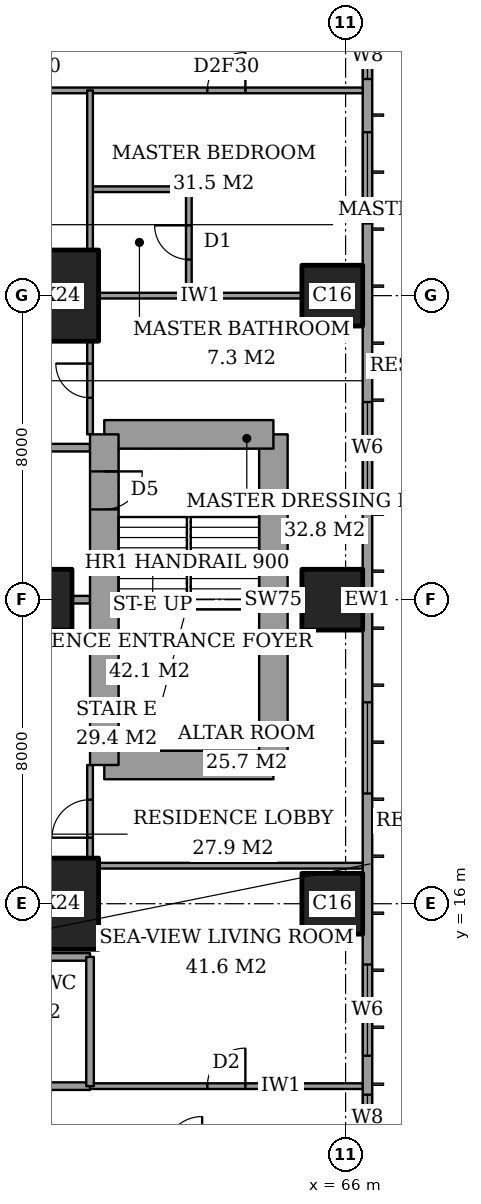
"""IFC4 building model, lengths in metres.
Left out: names, types, materials, properties, quantities, classifications, styles, units other than length and angle.
Written with IfcOpenShell. Run it as: python <this file> out.ifc"""

import sys

from ifc_helpers import new_model, si_unit, direction, frame, frame_2d, origin, origin_2d, place, context, subcontext, project, spatial, rectangle, extrude, element, fill, save


model = new_model("IFC4")
c1 = context("Model", 3, precision=1e-05, world=origin(), true_north=direction((0.0, 1.0)))
c2 = subcontext(c1, "Body", "Model", "MODEL_VIEW")
j1 = project(units=[si_unit("LENGTHUNIT", "METRE"), si_unit("PLANEANGLEUNIT", "RADIAN")], contexts=[c1])
p1 = place(None, origin())
s1 = spatial("IfcSite", under=j1, at=p1, CompositionType="ELEMENT")
p2 = place(p1, origin())
s2 = spatial("IfcBuilding", under=s1, at=p2, CompositionType="ELEMENT")
p3 = place(p2, frame((0.0, 0.0, 259.2)))
s3 = spatial("IfcBuildingStorey", under=s2, at=p3, CompositionType="ELEMENT", Elevation=259.2)
p4 = place(p3, frame((58.0, 16.0, 0.0), z_axis=(0.0, 0.0, 1.0), x_axis=(1.0, 0.0, 0.0)))
e1 = element("IfcColumn", 1, at=p4, inside=s3, PredefinedType="COLUMN", context=c2, shape_type="SweptSolid", body=[
    extrude(rectangle(XDim=3.0, YDim=2.4, at=origin_2d()), origin(), (0.0, 0.0, 1.0), 3.6),
])
p5 = place(p3, frame((58.0, 24.0, 0.0), z_axis=(0.0, 0.0, 1.0), x_axis=(1.0, 0.0, 0.0)))
e2 = element("IfcColumn", 2, at=p5, inside=s3, PredefinedType="COLUMN", context=c2, shape_type="SweptSolid", body=[
    extrude(rectangle(XDim=1.6, YDim=1.6, at=origin_2d()), origin(), (0.0, 0.0, 1.0), 3.6),
])
p6 = place(p3, frame((58.0, 32.0, 0.0), z_axis=(0.0, 0.0, 1.0), x_axis=(1.0, 0.0, 0.0)))
e3 = element("IfcColumn", 3, at=p6, inside=s3, PredefinedType="COLUMN", context=c2, shape_type="SweptSolid", body=[
    extrude(rectangle(XDim=3.0, YDim=2.4, at=origin_2d()), origin(), (0.0, 0.0, 1.0), 3.6),
])
for number, where, z_axis, x_axis in (
    (4, (65.65, 16.0, 0.0), (0.0, 0.0, 1.0), (1.0, 0.0, 0.0)),
    (5, (65.65, 24.0, 0.0), (0.0, 0.0, 1.0), (1.0, 0.0, 0.0)),
    (6, (65.65, 32.0, 0.0), (0.0, 0.0, 1.0), (1.0, 0.0, 0.0)),
):
    element("IfcColumn", number, at=place(p3, frame(where, z_axis=z_axis, x_axis=x_axis)), inside=s3, PredefinedType="COLUMN", context=c2, shape_type="SweptSolid", body=[
        extrude(rectangle(XDim=1.6, YDim=1.6, at=origin_2d()), origin(), (0.0, 0.0, 1.0), 3.6),
    ])
p7 = place(p3, frame((59.65, 19.65, 0.0), z_axis=(0.0, 0.0, 1.0), x_axis=(1.0, 0.0, 0.0)))
e7 = element("IfcWall", 7, at=p7, inside=s3, PredefinedType="SHEAR", context=c2, shape_type="SweptSolid", body=[
    extrude(rectangle(XDim=4.45, YDim=0.75, at=frame_2d((2.225, 0.0))), origin(), (0.0, 0.0, 1.0), 3.6),
])
p8 = place(p3, frame((64.1, 19.65, 0.0), z_axis=(0.0, 0.0, 1.0), x_axis=(0.0, 1.0, 0.0)))
e8 = element("IfcWall", 8, at=p8, inside=s3, PredefinedType="SHEAR", context=c2, shape_type="SweptSolid", body=[
    extrude(rectangle(XDim=8.7, YDim=0.75, at=frame_2d((4.35, 0.0))), origin(), (0.0, 0.0, 1.0), 3.6),
])
p9 = place(p3, frame((64.1, 28.35, 0.0), z_axis=(0.0, 0.0, 1.0), x_axis=(-1.0, 0.0, 0.0)))
e9 = element("IfcWall", 9, at=p9, inside=s3, PredefinedType="SHEAR", context=c2, shape_type="SweptSolid", body=[
    extrude(rectangle(XDim=4.45, YDim=0.75, at=frame_2d((2.225, 0.0))), origin(), (0.0, 0.0, 1.0), 3.6),
])
p10 = place(p3, frame((59.65, 28.35, 0.0), z_axis=(0.0, 0.0, 1.0), x_axis=(0.0, -1.0, 0.0)))
e10 = element("IfcWall", 10, at=p10, inside=s3, PredefinedType="SHEAR", context=c2, shape_type="SweptSolid", body=[
    extrude(rectangle(XDim=8.7, YDim=0.75, at=frame_2d((4.35, 0.0))), origin(), (0.0, 0.0, 1.0), 3.6),
])
p11 = place(p10, frame((0.975, 0.0, 0.0)))
e11 = element("IfcOpeningElement", 11, at=p11, cuts=e10, PredefinedType="OPENING", context=c2, shape_type="SweptSolid", body=[
    extrude(rectangle(XDim=1.0, YDim=2.1, at=frame_2d((0.5, 1.05))), frame((0.0, 0.385, 0.0), z_axis=(0.0, -1.0, 0.0), x_axis=(1.0, 0.0, 0.0)), (0.0, 0.0, 1.0), 0.77),
])
p12 = place(p3, frame((66.575, 3.175, 0.0), z_axis=(0.0, 0.0, 1.0), x_axis=(0.0, 1.0, 0.0)))
e12 = element("IfcWall", 12, at=p12, inside=s3, PredefinedType="SOLIDWALL", context=c2, shape_type="SweptSolid", body=[
    extrude(rectangle(XDim=41.65, YDim=0.25, at=frame_2d((20.825, 0.0))), origin(), (0.0, 0.0, 1.0), 3.6),
])
p13 = place(p12, frame((0.875, 0.0, 0.6)))
e13 = element("IfcOpeningElement", 13, at=p13, cuts=e12, PredefinedType="OPENING", context=c2, shape_type="SweptSolid", body=[
    extrude(rectangle(XDim=2.4, YDim=2.0, at=frame_2d((1.2, 1.0))), frame((0.0, 0.135, 0.0), z_axis=(0.0, -1.0, 0.0), x_axis=(1.0, 0.0, 0.0)), (0.0, 0.0, 1.0), 0.27),
])
p14 = place(p12, frame((6.6, 0.0, 0.6)))
e14 = element("IfcOpeningElement", 14, at=p14, cuts=e12, PredefinedType="OPENING", context=c2, shape_type="SweptSolid", body=[
    extrude(rectangle(XDim=1.2, YDim=2.0, at=frame_2d((0.6, 1.0))), frame((0.0, 0.135, 0.0), z_axis=(0.0, -1.0, 0.0), x_axis=(1.0, 0.0, 0.0)), (0.0, 0.0, 1.0), 0.27),
])
p15 = place(p12, frame((8.825, 0.0, 0.6)))
e15 = element("IfcOpeningElement", 15, at=p15, cuts=e12, PredefinedType="OPENING", context=c2, shape_type="SweptSolid", body=[
    extrude(rectangle(XDim=2.4, YDim=2.0, at=frame_2d((1.2, 1.0))), frame((0.0, 0.135, 0.0), z_axis=(0.0, -1.0, 0.0), x_axis=(1.0, 0.0, 0.0)), (0.0, 0.0, 1.0), 0.27),
])
p16 = place(p12, frame((15.725, 0.0, 0.6)))
e16 = element("IfcOpeningElement", 16, at=p16, cuts=e12, PredefinedType="OPENING", context=c2, shape_type="SweptSolid", body=[
    extrude(rectangle(XDim=2.4, YDim=2.0, at=frame_2d((1.2, 1.0))), frame((0.0, 0.135, 0.0), z_axis=(0.0, -1.0, 0.0), x_axis=(1.0, 0.0, 0.0)), (0.0, 0.0, 1.0), 0.27),
])
p17 = place(p12, frame((23.625, 0.0, 0.6)))
e17 = element("IfcOpeningElement", 17, at=p17, cuts=e12, PredefinedType="OPENING", context=c2, shape_type="SweptSolid", body=[
    extrude(rectangle(XDim=2.4, YDim=2.0, at=frame_2d((1.2, 1.0))), frame((0.0, 0.135, 0.0), z_axis=(0.0, -1.0, 0.0), x_axis=(1.0, 0.0, 0.0)), (0.0, 0.0, 1.0), 0.27),
])
p18 = place(p12, frame((30.725, 0.0, 0.6)))
e18 = element("IfcOpeningElement", 18, at=p18, cuts=e12, PredefinedType="OPENING", context=c2, shape_type="SweptSolid", body=[
    extrude(rectangle(XDim=2.4, YDim=2.0, at=frame_2d((1.2, 1.0))), frame((0.0, 0.135, 0.0), z_axis=(0.0, -1.0, 0.0), x_axis=(1.0, 0.0, 0.0)), (0.0, 0.0, 1.0), 0.27),
])
p19 = place(p12, frame((34.525, 0.0, 0.6)))
e19 = element("IfcOpeningElement", 19, at=p19, cuts=e12, PredefinedType="OPENING", context=c2, shape_type="SweptSolid", body=[
    extrude(rectangle(XDim=1.2, YDim=2.0, at=frame_2d((0.6, 1.0))), frame((0.0, 0.135, 0.0), z_axis=(0.0, -1.0, 0.0), x_axis=(1.0, 0.0, 0.0)), (0.0, 0.0, 1.0), 0.27),
])
p20 = place(p12, frame((38.375, 0.0, 0.6)))
e20 = element("IfcOpeningElement", 20, at=p20, cuts=e12, PredefinedType="OPENING", context=c2, shape_type="SweptSolid", body=[
    extrude(rectangle(XDim=2.4, YDim=2.0, at=frame_2d((1.2, 1.0))), frame((0.0, 0.135, 0.0), z_axis=(0.0, -1.0, 0.0), x_axis=(1.0, 0.0, 0.0)), (0.0, 0.0, 1.0), 0.27),
])
p21 = place(p3, frame((55.6, 11.2, 0.0), z_axis=(0.0, 0.0, 1.0), x_axis=(1.0, 0.0, 0.0)))
e21 = element("IfcWall", 21, at=p21, inside=s3, PredefinedType="PARTITIONING", context=c2, shape_type="SweptSolid", body=[
    extrude(rectangle(XDim=3.675, YDim=0.2, at=frame_2d((1.837, 0.0))), origin(), (0.0, 0.0, 1.0), 3.35),
])
p22 = place(p21, frame((1.387, 0.0, 0.0)))
e22 = element("IfcOpeningElement", 22, at=p22, cuts=e21, PredefinedType="OPENING", context=c2, shape_type="SweptSolid", body=[
    extrude(rectangle(XDim=0.9, YDim=2.1, at=frame_2d((0.45, 1.05))), frame((0.0, 0.11, 0.0), z_axis=(0.0, -1.0, 0.0), x_axis=(1.0, 0.0, 0.0)), (0.0, 0.0, 1.0), 0.22),
])
p23 = place(p3, frame((59.275, 11.2, 0.0), z_axis=(0.0, 0.0, 1.0), x_axis=(1.0, 0.0, 0.0)))
e23 = element("IfcWall", 23, at=p23, inside=s3, PredefinedType="PARTITIONING", context=c2, shape_type="SweptSolid", body=[
    extrude(rectangle(XDim=7.175, YDim=0.15, at=frame_2d((3.587, 0.0))), origin(), (0.0, 0.0, 1.0), 3.35),
])
p24 = place(p23, frame((3.087, 0.0, 0.0)))
e24 = element("IfcOpeningElement", 24, at=p24, cuts=e23, PredefinedType="OPENING", context=c2, shape_type="SweptSolid", body=[
    extrude(rectangle(XDim=1.0, YDim=2.1, at=frame_2d((0.5, 1.05))), frame((0.0, 0.085, 0.0), z_axis=(0.0, -1.0, 0.0), x_axis=(1.0, 0.0, 0.0)), (0.0, 0.0, 1.0), 0.17),
])
p25 = place(p3, frame((55.6, 14.6, 0.0), z_axis=(0.0, 0.0, 1.0), x_axis=(1.0, 0.0, 0.0)))
e25 = element("IfcWall", 25, at=p25, inside=s3, PredefinedType="PARTITIONING", context=c2, shape_type="SweptSolid", body=[
    extrude(rectangle(XDim=3.675, YDim=0.2, at=frame_2d((1.837, 0.0))), origin(), (0.0, 0.0, 1.0), 3.35),
])
p26 = place(p3, frame((59.5, 17.0, 0.0), z_axis=(0.0, 0.0, 1.0), x_axis=(1.0, 0.0, 0.0)))
e26 = element("IfcWall", 26, at=p26, inside=s3, PredefinedType="PARTITIONING", context=c2, shape_type="SweptSolid", body=[
    extrude(rectangle(XDim=6.95, YDim=0.15, at=frame_2d((3.475, 0.0))), origin(), (0.0, 0.0, 1.0), 3.35),
])
p27 = place(p3, frame((58.8, 24.0, 0.0), z_axis=(0.0, 0.0, 1.0), x_axis=(1.0, 0.0, 0.0)))
e27 = element("IfcWall", 27, at=p27, inside=s3, PredefinedType="PARTITIONING", context=c2, shape_type="SweptSolid", body=[
    extrude(rectangle(XDim=0.475, YDim=0.2, at=frame_2d((0.237, 0.0))), origin(), (0.0, 0.0, 1.0), 3.35),
])
p28 = place(p3, frame((64.475, 24.0, 0.0), z_axis=(0.0, 0.0, 1.0), x_axis=(1.0, 0.0, 0.0)))
e28 = element("IfcWall", 28, at=p28, inside=s3, PredefinedType="PARTITIONING", context=c2, shape_type="SweptSolid", body=[
    extrude(rectangle(XDim=0.375, YDim=0.15, at=frame_2d((0.188, 0.0))), origin(), (0.0, 0.0, 1.0), 3.35),
])
p29 = place(p3, frame((42.0, 28.0, 0.0), z_axis=(0.0, 0.0, 1.0), x_axis=(1.0, 0.0, 0.0)))
e29 = element("IfcWall", 29, at=p29, inside=s3, PredefinedType="PARTITIONING", context=c2, shape_type="SweptSolid", body=[
    extrude(rectangle(XDim=17.275, YDim=0.2, at=frame_2d((8.637, 0.0))), origin(), (0.0, 0.0, 1.0), 3.35),
])
p30 = place(p29, frame((9.4, 0.0, 0.0)))
e30 = element("IfcOpeningElement", 30, at=p30, cuts=e29, PredefinedType="OPENING", context=c2, shape_type="SweptSolid", body=[
    extrude(rectangle(XDim=1.2, YDim=2.4, at=frame_2d((0.6, 1.2))), frame((0.0, 0.11, 0.0), z_axis=(0.0, -1.0, 0.0), x_axis=(1.0, 0.0, 0.0)), (0.0, 0.0, 1.0), 0.22),
])
p31 = place(p3, frame((59.5, 32.0, 0.0), z_axis=(0.0, 0.0, 1.0), x_axis=(1.0, 0.0, 0.0)))
e31 = element("IfcWall", 31, at=p31, inside=s3, PredefinedType="PARTITIONING", context=c2, shape_type="SweptSolid", body=[
    extrude(rectangle(XDim=5.35, YDim=0.15, at=frame_2d((2.675, 0.0))), origin(), (0.0, 0.0, 1.0), 2.634),
])
p32 = place(p3, frame((59.275, 34.8, 0.0), z_axis=(0.0, 0.0, 1.0), x_axis=(1.0, 0.0, 0.0)))
e32 = element("IfcWall", 32, at=p32, inside=s3, PredefinedType="PARTITIONING", context=c2, shape_type="SweptSolid", body=[
    extrude(rectangle(XDim=2.6, YDim=0.15, at=frame_2d((1.3, 0.0))), origin(), (0.0, 0.0, 1.0), 3.35),
])
p33 = place(p3, frame((41.439, 37.4, 0.0), z_axis=(0.0, 0.0, 1.0), x_axis=(1.0, 0.0, 0.0)))
e33 = element("IfcWall", 33, at=p33, inside=s3, PredefinedType="PARTITIONING", context=c2, shape_type="SweptSolid", body=[
    extrude(rectangle(XDim=25.011, YDim=0.15, at=frame_2d((12.505, 0.0))), origin(), (0.0, 0.0, 1.0), 3.35),
])
p34 = place(p33, frame((12.961, 0.0, 0.0)))
e34 = element("IfcOpeningElement", 34, at=p34, cuts=e33, PredefinedType="OPENING", context=c2, shape_type="SweptSolid", body=[
    extrude(rectangle(XDim=1.0, YDim=2.1, at=frame_2d((0.5, 1.05))), frame((0.0, 0.085, 0.0), z_axis=(0.0, -1.0, 0.0), x_axis=(1.0, 0.0, 0.0)), (0.0, 0.0, 1.0), 0.17),
])
p35 = place(p33, frame((20.924, 0.0, 0.0)))
e35 = element("IfcOpeningElement", 35, at=p35, cuts=e33, PredefinedType="OPENING", context=c2, shape_type="SweptSolid", body=[
    extrude(rectangle(XDim=1.0, YDim=2.1, at=frame_2d((0.5, 1.05))), frame((0.0, 0.085, 0.0), z_axis=(0.0, -1.0, 0.0), x_axis=(1.0, 0.0, 0.0)), (0.0, 0.0, 1.0), 0.17),
])
p36 = place(p33, frame((15.749, 0.0, 0.0)))
e36 = element("IfcOpeningElement", 36, at=p36, cuts=e33, PredefinedType="OPENING", context=c2, shape_type="SweptSolid", body=[
    extrude(rectangle(XDim=0.9, YDim=2.1, at=frame_2d((0.45, 1.05))), frame((0.0, 0.085, 0.0), z_axis=(0.0, -1.0, 0.0), x_axis=(1.0, 0.0, 0.0)), (0.0, 0.0, 1.0), 0.17),
])
p37 = place(p33, frame((8.961, 0.0, 0.0)))
e37 = element("IfcOpeningElement", 37, at=p37, cuts=e33, PredefinedType="OPENING", context=c2, shape_type="SweptSolid", body=[
    extrude(rectangle(XDim=1.0, YDim=2.1, at=frame_2d((0.5, 1.05))), frame((0.0, 0.085, 0.0), z_axis=(0.0, -1.0, 0.0), x_axis=(1.0, 0.0, 0.0)), (0.0, 0.0, 1.0), 0.17),
])
p38 = place(p33, frame((2.836, 0.0, 0.0)))
e38 = element("IfcOpeningElement", 38, at=p38, cuts=e33, PredefinedType="OPENING", context=c2, shape_type="SweptSolid", body=[
    extrude(rectangle(XDim=1.0, YDim=2.1, at=frame_2d((0.5, 1.05))), frame((0.0, 0.085, 0.0), z_axis=(0.0, -1.0, 0.0), x_axis=(1.0, 0.0, 0.0)), (0.0, 0.0, 1.0), 0.17),
])
p39 = place(p3, frame((59.275, 11.2, 0.0), z_axis=(0.0, 0.0, 1.0), x_axis=(0.0, 1.0, 0.0)))
e39 = element("IfcWall", 39, at=p39, inside=s3, PredefinedType="PARTITIONING", context=c2, shape_type="SweptSolid", body=[
    extrude(rectangle(XDim=3.4, YDim=0.2, at=frame_2d((1.7, 0.0))), origin(), (0.0, 0.0, 1.0), 3.35),
])
p40 = place(p3, frame((59.275, 17.2, 0.0), z_axis=(0.0, 0.0, 1.0), x_axis=(0.0, 1.0, 0.0)))
e40 = element("IfcWall", 40, at=p40, inside=s3, PredefinedType="PARTITIONING", context=c2, shape_type="SweptSolid", body=[
    extrude(rectangle(XDim=2.45, YDim=0.15, at=frame_2d((1.225, 0.0))), origin(), (0.0, 0.0, 1.0), 3.35),
])
p41 = place(p40, frame((0.538, 0.0, 0.0)))
e41 = element("IfcOpeningElement", 41, at=p41, cuts=e40, PredefinedType="OPENING", context=c2, shape_type="SweptSolid", body=[
    extrude(rectangle(XDim=1.0, YDim=2.1, at=frame_2d((0.5, 1.05))), frame((0.0, 0.085, 0.0), z_axis=(0.0, -1.0, 0.0), x_axis=(1.0, 0.0, 0.0)), (0.0, 0.0, 1.0), 0.17),
])
p42 = place(p3, frame((59.275, 28.35, 0.0), z_axis=(0.0, 0.0, 1.0), x_axis=(0.0, 1.0, 0.0)))
e42 = element("IfcWall", 42, at=p42, inside=s3, PredefinedType="PARTITIONING", context=c2, shape_type="SweptSolid", body=[
    extrude(rectangle(XDim=2.45, YDim=0.15, at=frame_2d((1.225, 0.0))), origin(), (0.0, 0.0, 1.0), 3.35),
])
p43 = place(p42, frame((0.962, 0.0, 0.0)))
e43 = element("IfcOpeningElement", 43, at=p43, cuts=e42, PredefinedType="OPENING", context=c2, shape_type="SweptSolid", body=[
    extrude(rectangle(XDim=0.9, YDim=2.1, at=frame_2d((0.45, 1.05))), frame((0.0, 0.085, 0.0), z_axis=(0.0, -1.0, 0.0), x_axis=(1.0, 0.0, 0.0)), (0.0, 0.0, 1.0), 0.17),
])
p44 = place(p3, frame((59.275, 33.2, 0.0), z_axis=(0.0, 0.0, 1.0), x_axis=(0.0, 1.0, 0.0)))
e44 = element("IfcWall", 44, at=p44, inside=s3, PredefinedType="PARTITIONING", context=c2, shape_type="SweptSolid", body=[
    extrude(rectangle(XDim=4.2, YDim=0.15, at=frame_2d((2.1, 0.0))), origin(), (0.0, 0.0, 1.0), 3.35),
])
p45 = place(p3, frame((61.875, 32.0, 0.0), z_axis=(0.0, 0.0, 1.0), x_axis=(0.0, 1.0, 0.0)))
e45 = element("IfcWall", 45, at=p45, inside=s3, PredefinedType="PARTITIONING", context=c2, shape_type="SweptSolid", body=[
    extrude(rectangle(XDim=2.8, YDim=0.15, at=frame_2d((1.4, 0.0))), origin(), (0.0, 0.0, 1.0), 3.35),
])
p46 = place(p45, frame((0.95, 0.0, 0.0)))
e46 = element("IfcOpeningElement", 46, at=p46, cuts=e45, PredefinedType="OPENING", context=c2, shape_type="SweptSolid", body=[
    extrude(rectangle(XDim=0.9, YDim=2.1, at=frame_2d((0.45, 1.05))), frame((0.0, 0.085, 0.0), z_axis=(0.0, -1.0, 0.0), x_axis=(1.0, 0.0, 0.0)), (0.0, 0.0, 1.0), 0.17),
])
p47 = place(p14, origin())
e47 = element("IfcWindow", 47, at=p47, inside=s3, PartitioningType="SINGLE_PANEL", PredefinedType="WINDOW", context=c2, shape_type="SweptSolid", body=[
    extrude(rectangle(XDim=1.2, YDim=2.0, at=frame_2d((0.6, 1.0))), frame((0.0, 0.03, 0.0), z_axis=(0.0, -1.0, 0.0), x_axis=(1.0, 0.0, 0.0)), (0.0, 0.0, 1.0), 0.06),
])
fill(e14, e47)
p48 = place(p15, origin())
e48 = element("IfcWindow", 48, at=p48, inside=s3, PartitioningType="SINGLE_PANEL", PredefinedType="WINDOW", context=c2, shape_type="SweptSolid", body=[
    extrude(rectangle(XDim=2.4, YDim=2.0, at=frame_2d((1.2, 1.0))), frame((0.0, 0.03, 0.0), z_axis=(0.0, -1.0, 0.0), x_axis=(1.0, 0.0, 0.0)), (0.0, 0.0, 1.0), 0.06),
])
fill(e15, e48)
p49 = place(p16, origin())
e49 = element("IfcWindow", 49, at=p49, inside=s3, PartitioningType="SINGLE_PANEL", PredefinedType="WINDOW", context=c2, shape_type="SweptSolid", body=[
    extrude(rectangle(XDim=2.4, YDim=2.0, at=frame_2d((1.2, 1.0))), frame((0.0, 0.03, 0.0), z_axis=(0.0, -1.0, 0.0), x_axis=(1.0, 0.0, 0.0)), (0.0, 0.0, 1.0), 0.06),
])
fill(e16, e49)
p50 = place(p17, origin())
e50 = element("IfcWindow", 50, at=p50, inside=s3, PartitioningType="SINGLE_PANEL", PredefinedType="WINDOW", context=c2, shape_type="SweptSolid", body=[
    extrude(rectangle(XDim=2.4, YDim=2.0, at=frame_2d((1.2, 1.0))), frame((0.0, 0.03, 0.0), z_axis=(0.0, -1.0, 0.0), x_axis=(1.0, 0.0, 0.0)), (0.0, 0.0, 1.0), 0.06),
])
fill(e17, e50)
p51 = place(p18, origin())
e51 = element("IfcWindow", 51, at=p51, inside=s3, PartitioningType="SINGLE_PANEL", PredefinedType="WINDOW", context=c2, shape_type="SweptSolid", body=[
    extrude(rectangle(XDim=2.4, YDim=2.0, at=frame_2d((1.2, 1.0))), frame((0.0, 0.03, 0.0), z_axis=(0.0, -1.0, 0.0), x_axis=(1.0, 0.0, 0.0)), (0.0, 0.0, 1.0), 0.06),
])
fill(e18, e51)
p52 = place(p19, origin())
e52 = element("IfcWindow", 52, at=p52, inside=s3, PartitioningType="SINGLE_PANEL", PredefinedType="WINDOW", context=c2, shape_type="SweptSolid", body=[
    extrude(rectangle(XDim=1.2, YDim=2.0, at=frame_2d((0.6, 1.0))), frame((0.0, 0.03, 0.0), z_axis=(0.0, -1.0, 0.0), x_axis=(1.0, 0.0, 0.0)), (0.0, 0.0, 1.0), 0.06),
])
fill(e19, e52)
p53 = place(p24, origin())
e53 = element("IfcDoor", 53, at=p53, inside=s3, OperationType="SINGLE_SWING_LEFT", PredefinedType="DOOR", context=c2, shape_type="SweptSolid", body=[
    extrude(rectangle(XDim=1.0, YDim=2.1, at=frame_2d((0.5, 1.05))), frame((0.0, 0.025, 0.0), z_axis=(0.0, -1.0, 0.0), x_axis=(1.0, 0.0, 0.0)), (0.0, 0.0, 1.0), 0.05),
])
fill(e24, e53)
p54 = place(p41, origin())
e54 = element("IfcDoor", 54, at=p54, inside=s3, OperationType="SINGLE_SWING_RIGHT", PredefinedType="DOOR", context=c2, shape_type="SweptSolid", body=[
    extrude(rectangle(XDim=1.0, YDim=2.1, at=frame_2d((0.5, 1.05))), frame((0.0, 0.025, 0.0), z_axis=(0.0, -1.0, 0.0), x_axis=(1.0, 0.0, 0.0)), (0.0, 0.0, 1.0), 0.05),
])
fill(e41, e54)
p55 = place(p46, origin())
e55 = element("IfcDoor", 55, at=p55, inside=s3, OperationType="SINGLE_SWING_LEFT", PredefinedType="DOOR", context=c2, shape_type="SweptSolid", body=[
    extrude(rectangle(XDim=0.9, YDim=2.1, at=frame_2d((0.45, 1.05))), frame((0.0, 0.025, 0.0), z_axis=(0.0, -1.0, 0.0), x_axis=(1.0, 0.0, 0.0)), (0.0, 0.0, 1.0), 0.05),
])
fill(e46, e55)
p56 = place(p35, origin())
e56 = element("IfcDoor", 56, at=p56, inside=s3, OperationType="SINGLE_SWING_LEFT", PredefinedType="DOOR", context=c2, shape_type="SweptSolid", body=[
    extrude(rectangle(XDim=1.0, YDim=2.1, at=frame_2d((0.5, 1.05))), frame((0.0, 0.025, 0.0), z_axis=(0.0, -1.0, 0.0), x_axis=(1.0, 0.0, 0.0)), (0.0, 0.0, 1.0), 0.05),
])
fill(e35, e56)
p57 = place(p43, origin())
e57 = element("IfcDoor", 57, at=p57, inside=s3, OperationType="SINGLE_SWING_LEFT", PredefinedType="DOOR", context=c2, shape_type="SweptSolid", body=[
    extrude(rectangle(XDim=0.9, YDim=2.1, at=frame_2d((0.45, 1.05))), frame((0.0, 0.025, 0.0), z_axis=(0.0, -1.0, 0.0), x_axis=(1.0, 0.0, 0.0)), (0.0, 0.0, 1.0), 0.05),
])
fill(e43, e57)
p58 = place(p11, origin())
e58 = element("IfcDoor", 58, at=p58, inside=s3, OperationType="SINGLE_SWING_RIGHT", PredefinedType="DOOR", context=c2, shape_type="SweptSolid", body=[
    extrude(rectangle(XDim=1.0, YDim=2.1, at=frame_2d((0.5, 1.05))), frame((0.0, 0.025, 0.0), z_axis=(0.0, -1.0, 0.0), x_axis=(1.0, 0.0, 0.0)), (0.0, 0.0, 1.0), 0.05),
])
fill(e11, e58)
save(model, sys.argv[1])
